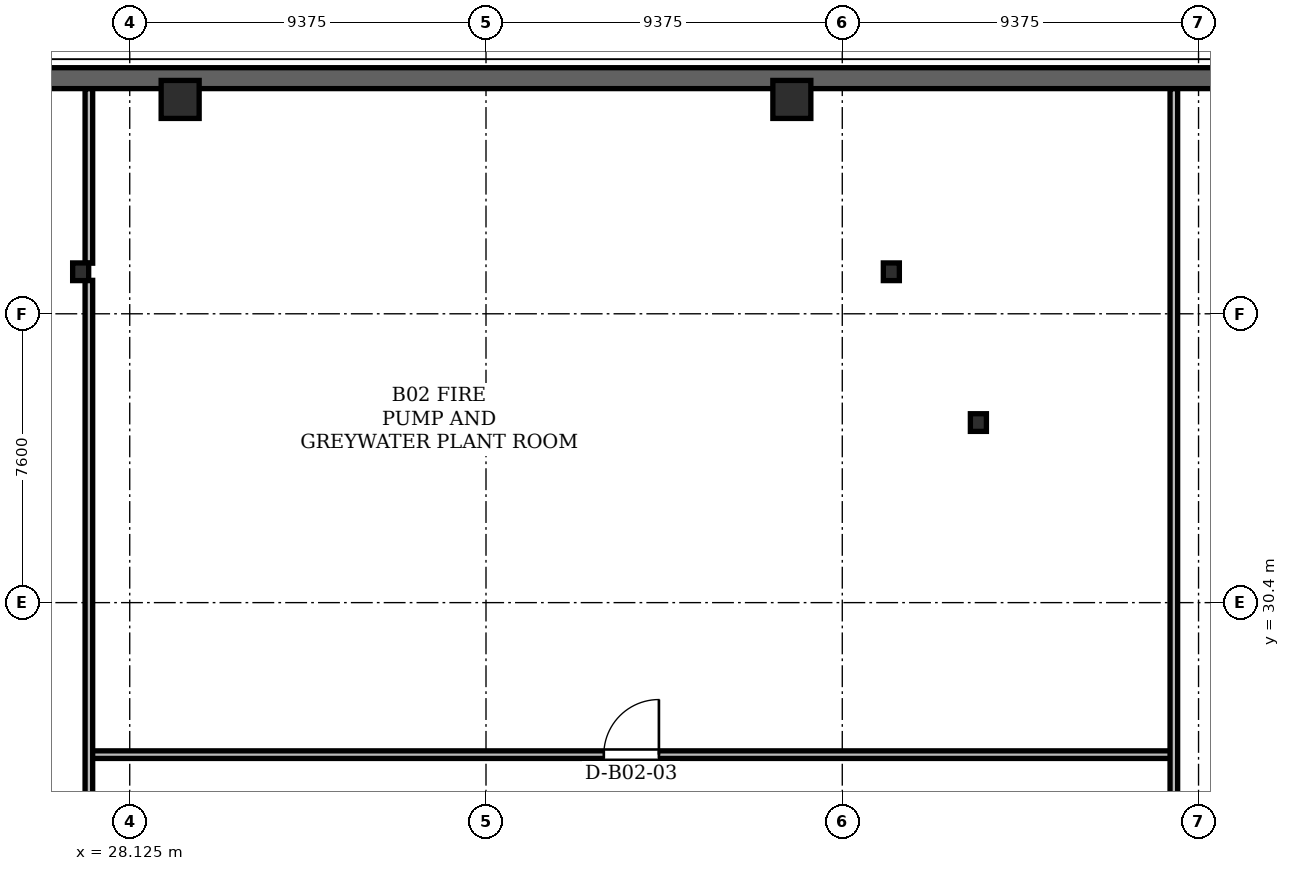
"""IFC4 building model, lengths in metres.
Left out: names, types, materials, properties, quantities, classifications, styles, units other than length and angle.
Written with IfcOpenShell. Run it as: python <this file> out.ifc"""

import sys

from ifc_helpers import new_model, si_unit, direction, frame, frame_2d, origin, origin_2d, place, context, subcontext, project, spatial, rectangle, hollow_rectangle, i_section, extrude, element, fill, save


model = new_model("IFC4")
c1 = context("Model", 3, precision=1e-05, world=origin(), true_north=direction((0.0, 1.0)))
c2 = subcontext(c1, "Body", "Model", "MODEL_VIEW")
j1 = project(units=[si_unit("LENGTHUNIT", "METRE"), si_unit("PLANEANGLEUNIT", "RADIAN")], contexts=[c1])
p1 = place(None, origin())
s1 = spatial("IfcSite", under=j1, at=p1, CompositionType="ELEMENT")
p2 = place(p1, origin())
s2 = spatial("IfcBuilding", under=s1, at=p2, CompositionType="ELEMENT")
p3 = place(p2, frame((0.0, 0.0, -8.0)))
s3 = spatial("IfcBuildingStorey", under=s2, at=p3, CompositionType="ELEMENT", Elevation=-8.0)
for number, where, z_axis, x_axis in (
    (1, (45.548, 43.64, 0.0), (0.0, 0.0, 1.0), (1.0, 0.0, 0.0)),
    (2, (29.452, 43.64, 0.0), (0.0, 0.0, 1.0), (1.0, 0.0, 0.0)),
):
    element("IfcColumn", number, at=place(p3, frame(where, z_axis=z_axis, x_axis=x_axis)), inside=s3, PredefinedType="COLUMN", context=c2, shape_type="SweptSolid", body=[
        extrude(hollow_rectangle(XDim=1.0, YDim=1.0, WallThickness=0.085, at=origin_2d()), origin(), (0.0, 0.0, 1.0), 3.996),
    ])
for number, where, z_axis, x_axis in (
    (3, (50.457, 35.138, 0.0), (0.0, 0.0, 1.0), (1.0, 0.0, 0.0)),
    (4, (48.166, 39.106, 0.0), (0.0, 0.0, 1.0), (1.0, 0.0, 0.0)),
    (5, (26.834, 39.106, 0.0), (0.0, 0.0, 1.0), (1.0, 0.0, 0.0)),
):
    element("IfcColumn", number, at=place(p3, frame(where, z_axis=z_axis, x_axis=x_axis)), inside=s3, PredefinedType="COLUMN", context=c2, shape_type="SweptSolid", body=[
        extrude(i_section(OverallWidth=0.422, OverallDepth=0.465, WebThickness=0.045, FlangeThickness=0.072, at=origin_2d()), origin(), (0.0, 0.0, 1.0), 3.996),
    ])
p4 = place(p3, frame((76.093, 44.2, 0.0), z_axis=(0.0, 0.0, 1.0), x_axis=(-1.0, 0.0, 0.0)))
e6 = element("IfcWall", 6, at=p4, inside=s3, PredefinedType="USERDEFINED", context=c2, shape_type="SweptSolid", body=[
    extrude(rectangle(XDim=77.186, YDim=0.55, at=frame_2d((38.593, 0.0))), origin(), (0.0, 0.0, 1.0), 3.72),
])
p5 = place(p3, frame((27.05, 26.4, 0.0), z_axis=(0.0, 0.0, 1.0), x_axis=(1.0, 0.0, 0.0)))
e7 = element("IfcWall", 7, at=p5, inside=s3, PredefinedType="PARTITIONING", context=c2, shape_type="SweptSolid", body=[
    extrude(rectangle(XDim=28.55, YDim=0.2, at=frame_2d((14.275, 0.0))), origin(), (0.0, 0.0, 1.0), 2.783),
])
p6 = place(p5, frame((13.55, 0.0, 0.0)))
e8 = element("IfcOpeningElement", 8, at=p6, cuts=e7, PredefinedType="OPENING", context=c2, shape_type="SweptSolid", body=[
    extrude(rectangle(XDim=1.45, YDim=2.25, at=frame_2d((0.725, 1.125))), frame((0.0, 0.1, 0.0), z_axis=(0.0, -1.0, 0.0), x_axis=(1.0, 0.0, 0.0)), (0.0, 0.0, 1.0), 0.2),
])
p7 = place(p3, frame((27.05, 10.504, 0.0), z_axis=(0.0, 0.0, 1.0), x_axis=(0.0, 1.0, 0.0)))
e9 = element("IfcWall", 9, at=p7, inside=s3, PredefinedType="PARTITIONING", context=c2, shape_type="SweptSolid", body=[
    extrude(rectangle(XDim=28.376, YDim=0.2, at=frame_2d((14.188, 0.0))), origin(), (0.0, 0.0, 1.0), 2.783),
])
p8 = place(p7, frame((5.9, 0.0, 0.0)))
e10 = element("IfcOpeningElement", 10, at=p8, cuts=e9, PredefinedType="OPENING", context=c2, shape_type="SweptSolid", body=[
    extrude(rectangle(XDim=1.45, YDim=2.25, at=frame_2d((0.725, 1.125))), frame((0.0, 0.1, 0.0), z_axis=(0.0, -1.0, 0.0), x_axis=(1.0, 0.0, 0.0)), (0.0, 0.0, 1.0), 0.2),
])
p9 = place(p3, frame((27.05, 39.332, 0.0), z_axis=(0.0, 0.0, 1.0), x_axis=(0.0, 1.0, 0.0)))
e11 = element("IfcWall", 11, at=p9, inside=s3, PredefinedType="PARTITIONING", context=c2, shape_type="SweptSolid", body=[
    extrude(rectangle(XDim=4.589, YDim=0.2, at=frame_2d((2.295, 0.0))), origin(), (0.0, 0.0, 1.0), 2.854),
])
p10 = place(p3, frame((55.6, 1.679, 0.0), z_axis=(0.0, 0.0, 1.0), x_axis=(0.0, 1.0, 0.0)))
e12 = element("IfcWall", 12, at=p10, inside=s3, PredefinedType="PARTITIONING", context=c2, shape_type="SweptSolid", body=[
    extrude(rectangle(XDim=42.242, YDim=0.2, at=frame_2d((21.121, 0.0))), origin(), (0.0, 0.0, 1.0), 2.51),
])
p11 = place(p10, frame((14.725, 0.0, 0.0)))
e13 = element("IfcOpeningElement", 13, at=p11, cuts=e12, PredefinedType="OPENING", context=c2, shape_type="SweptSolid", body=[
    extrude(rectangle(XDim=1.45, YDim=2.25, at=frame_2d((0.725, 1.125))), frame((0.0, 0.1, 0.0), z_axis=(0.0, -1.0, 0.0), x_axis=(1.0, 0.0, 0.0)), (0.0, 0.0, 1.0), 0.2),
])
p12 = place(p6, origin())
e14 = element("IfcDoor", 14, at=p12, inside=s3, OperationType="SINGLE_SWING_RIGHT", PredefinedType="DOOR", context=c2, shape_type="SweptSolid", body=[
    extrude(rectangle(XDim=1.45, YDim=2.25, at=frame_2d((0.725, 1.125))), frame((0.0, 0.025, 0.0), z_axis=(0.0, -1.0, 0.0), x_axis=(1.0, 0.0, 0.0)), (0.0, 0.0, 1.0), 0.05),
])
fill(e8, e14)
save(model, sys.argv[1])
